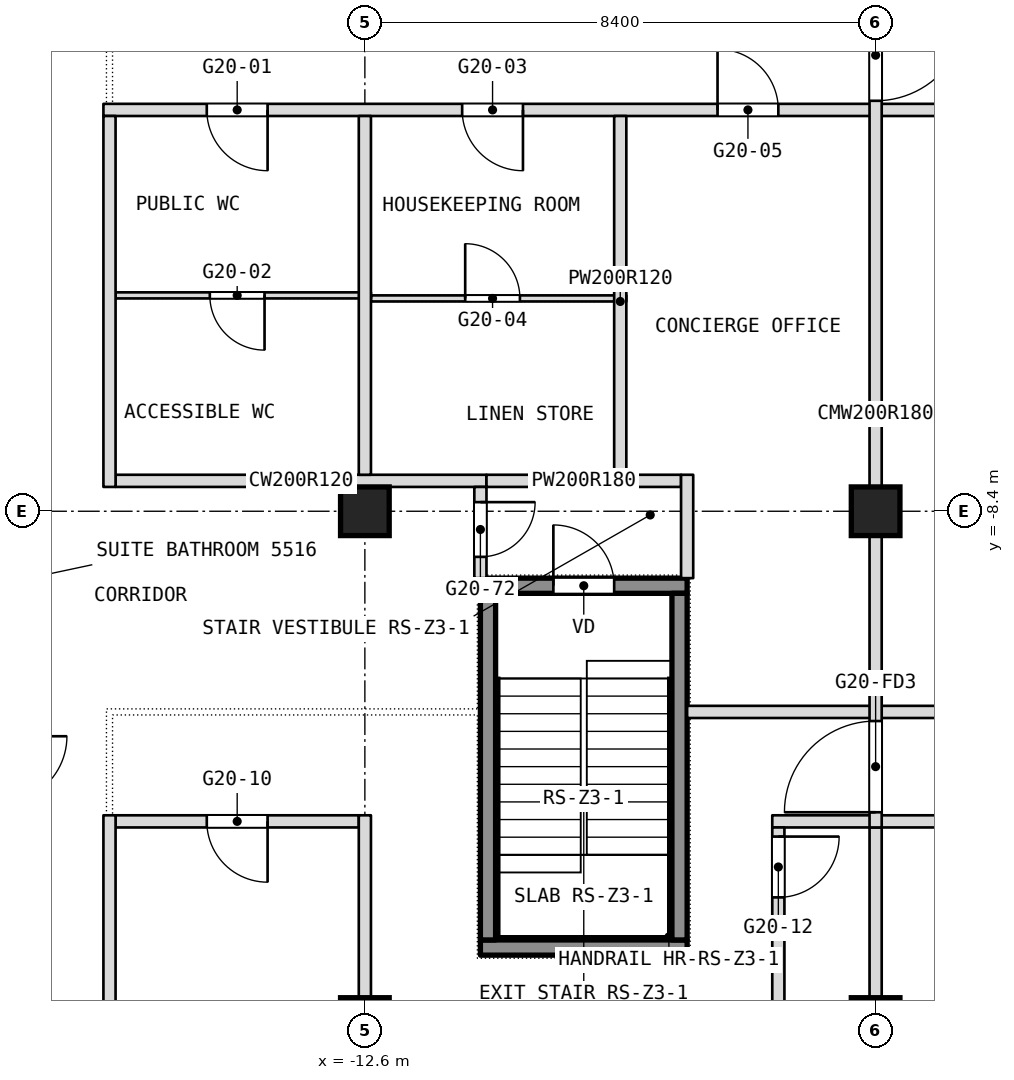
"""IFC4 building model, lengths in metres.
Left out: names, types, materials, properties, quantities, classifications, styles, units other than length and angle.
Written with IfcOpenShell. Run it as: python <this file> out.ifc"""

import sys

from ifc_helpers import new_model, si_unit, direction, frame, frame_2d, origin, origin_2d, place, context, subcontext, project, spatial, rectangle, extrude, element, fill, save


model = new_model("IFC4")
c1 = context("Model", 3, precision=1e-05, world=origin(), true_north=direction((0.0, 1.0)))
c2 = subcontext(c1, "Body", "Model", "MODEL_VIEW")
j1 = project(units=[si_unit("LENGTHUNIT", "METRE"), si_unit("PLANEANGLEUNIT", "RADIAN")], contexts=[c1])
p1 = place(None, origin())
s1 = spatial("IfcSite", under=j1, at=p1, CompositionType="ELEMENT")
p2 = place(p1, origin())
s2 = spatial("IfcBuilding", under=s1, at=p2, CompositionType="ELEMENT")
p3 = place(p2, frame((0.0, 0.0, 234.5)))
s3 = spatial("IfcBuildingStorey", under=s2, at=p3, CompositionType="ELEMENT", Elevation=234.5)
for number, where, z_axis, x_axis in (
    (1, (-12.6, -16.8, 0.0), (0.0, 0.0, 1.0), (1.0, 0.0, 0.0)),
    (2, (-12.6, -8.4, 0.0), (0.0, 0.0, 1.0), (1.0, 0.0, 0.0)),
    (3, (-4.2, -16.8, 0.0), (0.0, 0.0, 1.0), (1.0, 0.0, 0.0)),
    (4, (-4.2, -8.4, 0.0), (0.0, 0.0, 1.0), (1.0, 0.0, 0.0)),
):
    element("IfcColumn", number, at=place(p3, frame(where, z_axis=z_axis, x_axis=x_axis)), inside=s3, PredefinedType="COLUMN", context=c2, shape_type="SweptSolid", body=[
        extrude(rectangle(XDim=0.8, YDim=0.8, at=origin_2d()), origin(), (0.0, 0.0, 1.0), 3.6),
    ])
p4 = place(p3, frame((-16.7, -13.5, 0.0), z_axis=(0.0, 0.0, 1.0), x_axis=(1.0, 0.0, 0.0)))
e5 = element("IfcWall", 5, at=p4, inside=s3, PredefinedType="PARTITIONING", context=c2, shape_type="SweptSolid", body=[
    extrude(rectangle(XDim=4.0, YDim=0.2, at=frame_2d((2.0, 0.0))), origin(), (0.0, 0.0, 1.0), 3.34),
])
p5 = place(p4, frame((1.5, 0.0, 0.0)))
e6 = element("IfcOpeningElement", 6, at=p5, cuts=e5, PredefinedType="OPENING", context=c2, shape_type="SweptSolid", body=[
    extrude(rectangle(XDim=1.0, YDim=2.1, at=frame_2d((0.5, 1.05))), frame((0.0, 0.1, 0.0), z_axis=(0.0, -1.0, 0.0), x_axis=(1.0, 0.0, 0.0)), (0.0, 0.0, 1.0), 0.2),
])
p6 = place(p3, frame((-5.9, -13.5, 0.0), z_axis=(0.0, 0.0, 1.0), x_axis=(1.0, 0.0, 0.0)))
e7 = element("IfcWall", 7, at=p6, inside=s3, PredefinedType="PARTITIONING", context=c2, shape_type="SweptSolid", body=[
    extrude(rectangle(XDim=11.6, YDim=0.2, at=frame_2d((5.8, 0.0))), origin(), (0.0, 0.0, 1.0), 3.34),
])
p7 = place(p6, frame((3.3, 0.0, 0.0)))
e8 = element("IfcOpeningElement", 8, at=p7, cuts=e7, PredefinedType="OPENING", context=c2, shape_type="SweptSolid", body=[
    extrude(rectangle(XDim=1.0, YDim=2.1, at=frame_2d((0.5, 1.05))), frame((0.0, 0.1, 0.0), z_axis=(0.0, -1.0, 0.0), x_axis=(1.0, 0.0, 0.0)), (0.0, 0.0, 1.0), 0.2),
])
p8 = place(p6, frame((7.5, 0.0, 0.0)))
e9 = element("IfcOpeningElement", 9, at=p8, cuts=e7, PredefinedType="OPENING", context=c2, shape_type="SweptSolid", body=[
    extrude(rectangle(XDim=1.0, YDim=2.1, at=frame_2d((0.5, 1.05))), frame((0.0, 0.1, 0.0), z_axis=(0.0, -1.0, 0.0), x_axis=(1.0, 0.0, 0.0)), (0.0, 0.0, 1.0), 0.2),
])
p9 = place(p3, frame((-7.3, -11.7, 0.0), z_axis=(0.0, 0.0, 1.0), x_axis=(1.0, 0.0, 0.0)))
e10 = element("IfcWall", 10, at=p9, inside=s3, PredefinedType="PARTITIONING", context=c2, shape_type="SweptSolid", body=[
    extrude(rectangle(XDim=14.6, YDim=0.2, at=frame_2d((7.3, 0.0))), origin(), (0.0, 0.0, 1.0), 3.34),
])
p10 = place(p3, frame((-16.7, -7.9, 0.0), z_axis=(0.0, 0.0, 1.0), x_axis=(1.0, 0.0, 0.0)))
e11 = element("IfcWall", 11, at=p10, inside=s3, PredefinedType="PARTITIONING", context=c2, shape_type="SweptSolid", body=[
    extrude(rectangle(XDim=6.1, YDim=0.2, at=frame_2d((3.05, 0.0))), origin(), (0.0, 0.0, 1.0), 3.34),
])
p11 = place(p3, frame((-10.6, -7.9, 0.0), z_axis=(0.0, 0.0, 1.0), x_axis=(1.0, 0.0, 0.0)))
e12 = element("IfcWall", 12, at=p11, inside=s3, PredefinedType="PARTITIONING", context=c2, shape_type="SweptSolid", body=[
    extrude(rectangle(XDim=3.2, YDim=0.2, at=frame_2d((1.6, 0.0))), origin(), (0.0, 0.0, 1.0), 3.34),
])
p12 = place(p3, frame((-12.5, -4.9, 0.0), z_axis=(0.0, 0.0, 1.0), x_axis=(1.0, 0.0, 0.0)))
e13 = element("IfcWall", 13, at=p12, inside=s3, PredefinedType="PARTITIONING", context=c2, shape_type="SweptSolid", body=[
    extrude(rectangle(XDim=4.2, YDim=0.1, at=frame_2d((2.1, 0.0))), origin(), (0.0, 0.0, 1.0), 3.34),
])
p13 = place(p12, frame((1.55, 0.0, 0.0)))
e14 = element("IfcOpeningElement", 14, at=p13, cuts=e13, PredefinedType="OPENING", context=c2, shape_type="SweptSolid", body=[
    extrude(rectangle(XDim=0.9, YDim=2.1, at=frame_2d((0.45, 1.05))), frame((0.0, 0.05, 0.0), z_axis=(0.0, -1.0, 0.0), x_axis=(1.0, 0.0, 0.0)), (0.0, 0.0, 1.0), 0.1),
])
p14 = place(p3, frame((-16.7, -4.85, 0.0), z_axis=(0.0, 0.0, 1.0), x_axis=(1.0, 0.0, 0.0)))
e15 = element("IfcWall", 15, at=p14, inside=s3, PredefinedType="PARTITIONING", context=c2, shape_type="SweptSolid", body=[
    extrude(rectangle(XDim=4.2, YDim=0.1, at=frame_2d((2.1, 0.0))), origin(), (0.0, 0.0, 1.0), 3.34),
])
p15 = place(p14, frame((1.55, 0.0, 0.0)))
e16 = element("IfcOpeningElement", 16, at=p15, cuts=e15, PredefinedType="OPENING", context=c2, shape_type="SweptSolid", body=[
    extrude(rectangle(XDim=0.9, YDim=2.1, at=frame_2d((0.45, 1.05))), frame((0.0, 0.05, 0.0), z_axis=(0.0, -1.0, 0.0), x_axis=(1.0, 0.0, 0.0)), (0.0, 0.0, 1.0), 0.1),
])
p16 = place(p3, frame((-16.9, -1.8, 0.0), z_axis=(0.0, 0.0, 1.0), x_axis=(1.0, 0.0, 0.0)))
e17 = element("IfcWall", 17, at=p16, inside=s3, PredefinedType="PARTITIONING", context=c2, shape_type="SweptSolid", body=[
    extrude(rectangle(XDim=33.8, YDim=0.2, at=frame_2d((16.9, 0.0))), origin(), (0.0, 0.0, 1.0), 3.34),
])
p17 = place(p16, frame((1.7, 0.0, 0.0)))
e18 = element("IfcOpeningElement", 18, at=p17, cuts=e17, PredefinedType="OPENING", context=c2, shape_type="SweptSolid", body=[
    extrude(rectangle(XDim=1.0, YDim=2.1, at=frame_2d((0.5, 1.05))), frame((0.0, 0.1, 0.0), z_axis=(0.0, -1.0, 0.0), x_axis=(1.0, 0.0, 0.0)), (0.0, 0.0, 1.0), 0.2),
])
p18 = place(p16, frame((5.9, 0.0, 0.0)))
e19 = element("IfcOpeningElement", 19, at=p18, cuts=e17, PredefinedType="OPENING", context=c2, shape_type="SweptSolid", body=[
    extrude(rectangle(XDim=1.0, YDim=2.1, at=frame_2d((0.5, 1.05))), frame((0.0, 0.1, 0.0), z_axis=(0.0, -1.0, 0.0), x_axis=(1.0, 0.0, 0.0)), (0.0, 0.0, 1.0), 0.2),
])
p19 = place(p16, frame((10.1, 0.0, 0.0)))
e20 = element("IfcOpeningElement", 20, at=p19, cuts=e17, PredefinedType="OPENING", context=c2, shape_type="SweptSolid", body=[
    extrude(rectangle(XDim=1.0, YDim=2.1, at=frame_2d((0.5, 1.05))), frame((0.0, 0.1, 0.0), z_axis=(0.0, -1.0, 0.0), x_axis=(1.0, 0.0, 0.0)), (0.0, 0.0, 1.0), 0.2),
])
p20 = place(p16, frame((16.0, 0.0, 0.0)))
e21 = element("IfcOpeningElement", 21, at=p20, cuts=e17, PredefinedType="OPENING", context=c2, shape_type="SweptSolid", body=[
    extrude(rectangle(XDim=1.8, YDim=2.1, at=frame_2d((0.9, 1.05))), frame((0.0, 0.1, 0.0), z_axis=(0.0, -1.0, 0.0), x_axis=(1.0, 0.0, 0.0)), (0.0, 0.0, 1.0), 0.2),
])
p21 = place(p16, frame((22.7, 0.0, 0.0)))
e22 = element("IfcOpeningElement", 22, at=p21, cuts=e17, PredefinedType="OPENING", context=c2, shape_type="SweptSolid", body=[
    extrude(rectangle(XDim=1.0, YDim=2.1, at=frame_2d((0.5, 1.05))), frame((0.0, 0.1, 0.0), z_axis=(0.0, -1.0, 0.0), x_axis=(1.0, 0.0, 0.0)), (0.0, 0.0, 1.0), 0.2),
])
p22 = place(p16, frame((26.9, 0.0, 0.0)))
e23 = element("IfcOpeningElement", 23, at=p22, cuts=e17, PredefinedType="OPENING", context=c2, shape_type="SweptSolid", body=[
    extrude(rectangle(XDim=1.0, YDim=2.1, at=frame_2d((0.5, 1.05))), frame((0.0, 0.1, 0.0), z_axis=(0.0, -1.0, 0.0), x_axis=(1.0, 0.0, 0.0)), (0.0, 0.0, 1.0), 0.2),
])
p23 = place(p16, frame((31.1, 0.0, 0.0)))
e24 = element("IfcOpeningElement", 24, at=p23, cuts=e17, PredefinedType="OPENING", context=c2, shape_type="SweptSolid", body=[
    extrude(rectangle(XDim=1.0, YDim=2.1, at=frame_2d((0.5, 1.05))), frame((0.0, 0.1, 0.0), z_axis=(0.0, -1.0, 0.0), x_axis=(1.0, 0.0, 0.0)), (0.0, 0.0, 1.0), 0.2),
])
p24 = place(p3, frame((-4.2, -22.0, 0.0), z_axis=(0.0, 0.0, 1.0), x_axis=(0.0, 1.0, 0.0)))
e25 = element("IfcWall", 25, at=p24, inside=s3, PredefinedType="PARTITIONING", context=c2, shape_type="SweptSolid", body=[
    extrude(rectangle(XDim=8.4, YDim=0.2, at=frame_2d((4.2, 0.0))), origin(), (0.0, 0.0, 1.0), 3.34),
])
p25 = place(p24, frame((0.25, 0.0, 0.0)))
e26 = element("IfcOpeningElement", 26, at=p25, cuts=e25, PredefinedType="OPENING", context=c2, shape_type="SweptSolid", body=[
    extrude(rectangle(XDim=1.5, YDim=2.1, at=frame_2d((0.75, 1.05))), frame((0.0, 0.1, 0.0), z_axis=(0.0, -1.0, 0.0), x_axis=(1.0, 0.0, 0.0)), (0.0, 0.0, 1.0), 0.2),
])
p26 = place(p3, frame((-4.2, -13.6, 0.0), z_axis=(0.0, 0.0, 1.0), x_axis=(0.0, 1.0, 0.0)))
e27 = element("IfcWall", 27, at=p26, inside=s3, PredefinedType="PARTITIONING", context=c2, shape_type="SweptSolid", body=[
    extrude(rectangle(XDim=13.6, YDim=0.2, at=frame_2d((6.8, 0.0))), origin(), (0.0, 0.0, 1.0), 3.34),
])
p27 = place(p26, frame((11.95, 0.0, 0.0)))
e28 = element("IfcOpeningElement", 28, at=p27, cuts=e27, PredefinedType="OPENING", context=c2, shape_type="SweptSolid", body=[
    extrude(rectangle(XDim=1.5, YDim=2.1, at=frame_2d((0.75, 1.05))), frame((0.0, 0.1, 0.0), z_axis=(0.0, -1.0, 0.0), x_axis=(1.0, 0.0, 0.0)), (0.0, 0.0, 1.0), 0.2),
])
p28 = place(p26, frame((0.25, 0.0, 0.0)))
e29 = element("IfcOpeningElement", 29, at=p28, cuts=e27, PredefinedType="OPENING", context=c2, shape_type="SweptSolid", body=[
    extrude(rectangle(XDim=1.5, YDim=2.1, at=frame_2d((0.75, 1.05))), frame((0.0, 0.1, 0.0), z_axis=(0.0, -1.0, 0.0), x_axis=(1.0, 0.0, 0.0)), (0.0, 0.0, 1.0), 0.2),
])
p29 = place(p3, frame((-5.8, -18.5, 0.0), z_axis=(0.0, 0.0, 1.0), x_axis=(0.0, 1.0, 0.0)))
e30 = element("IfcWall", 30, at=p29, inside=s3, PredefinedType="PARTITIONING", context=c2, shape_type="SweptSolid", body=[
    extrude(rectangle(XDim=4.9, YDim=0.2, at=frame_2d((2.45, 0.0))), origin(), (0.0, 0.0, 1.0), 3.34),
])
p30 = place(p29, frame((3.75, 0.0, 0.0)))
e31 = element("IfcOpeningElement", 31, at=p30, cuts=e30, PredefinedType="OPENING", context=c2, shape_type="SweptSolid", body=[
    extrude(rectangle(XDim=1.0, YDim=2.1, at=frame_2d((0.5, 1.05))), frame((0.0, 0.1, 0.0), z_axis=(0.0, -1.0, 0.0), x_axis=(1.0, 0.0, 0.0)), (0.0, 0.0, 1.0), 0.2),
])
p31 = place(p3, frame((-7.3, -9.5, 0.0), z_axis=(0.0, 0.0, 1.0), x_axis=(0.0, 1.0, 0.0)))
e32 = element("IfcWall", 32, at=p31, inside=s3, PredefinedType="PARTITIONING", context=c2, shape_type="SweptSolid", body=[
    extrude(rectangle(XDim=1.7, YDim=0.2, at=frame_2d((0.85, 0.0))), origin(), (0.0, 0.0, 1.0), 3.34),
])
p32 = place(p3, frame((-8.4, -8.0, 0.0), z_axis=(0.0, 0.0, 1.0), x_axis=(0.0, 1.0, 0.0)))
e33 = element("IfcWall", 33, at=p32, inside=s3, PredefinedType="PARTITIONING", context=c2, shape_type="SweptSolid", body=[
    extrude(rectangle(XDim=6.1, YDim=0.2, at=frame_2d((3.05, 0.0))), origin(), (0.0, 0.0, 1.0), 3.34),
])
p33 = place(p3, frame((-10.7, -9.5, 0.0), z_axis=(0.0, 0.0, 1.0), x_axis=(0.0, 1.0, 0.0)))
e34 = element("IfcWall", 34, at=p33, inside=s3, PredefinedType="PARTITIONING", context=c2, shape_type="SweptSolid", body=[
    extrude(rectangle(XDim=1.5, YDim=0.2, at=frame_2d((0.75, 0.0))), origin(), (0.0, 0.0, 1.0), 3.34),
])
p34 = place(p33, frame((0.35, 0.0, 0.0)))
e35 = element("IfcOpeningElement", 35, at=p34, cuts=e34, PredefinedType="OPENING", context=c2, shape_type="SweptSolid", body=[
    extrude(rectangle(XDim=0.9, YDim=2.1, at=frame_2d((0.45, 1.05))), frame((0.0, 0.1, 0.0), z_axis=(0.0, -1.0, 0.0), x_axis=(1.0, 0.0, 0.0)), (0.0, 0.0, 1.0), 0.2),
])
p35 = place(p3, frame((-12.6, -7.8, 0.0), z_axis=(0.0, 0.0, 1.0), x_axis=(0.0, 1.0, 0.0)))
e36 = element("IfcWall", 36, at=p35, inside=s3, PredefinedType="PARTITIONING", context=c2, shape_type="SweptSolid", body=[
    extrude(rectangle(XDim=5.9, YDim=0.2, at=frame_2d((2.95, 0.0))), origin(), (0.0, 0.0, 1.0), 3.34),
])
p36 = place(p3, frame((-12.6, -18.5, 0.0), z_axis=(0.0, 0.0, 1.0), x_axis=(0.0, 1.0, 0.0)))
e37 = element("IfcWall", 37, at=p36, inside=s3, PredefinedType="PARTITIONING", context=c2, shape_type="SweptSolid", body=[
    extrude(rectangle(XDim=5.1, YDim=0.2, at=frame_2d((2.55, 0.0))), origin(), (0.0, 0.0, 1.0), 3.34),
])
p37 = place(p3, frame((-16.8, -20.2, 0.0), z_axis=(0.0, 0.0, 1.0), x_axis=(0.0, 1.0, 0.0)))
e38 = element("IfcWall", 38, at=p37, inside=s3, PredefinedType="PARTITIONING", context=c2, shape_type="SweptSolid", body=[
    extrude(rectangle(XDim=6.8, YDim=0.2, at=frame_2d((3.4, 0.0))), origin(), (0.0, 0.0, 1.0), 3.34),
])
p38 = place(p3, frame((-16.8, -8.0, 0.0), z_axis=(0.0, 0.0, 1.0), x_axis=(0.0, 1.0, 0.0)))
e39 = element("IfcWall", 39, at=p38, inside=s3, PredefinedType="PARTITIONING", context=c2, shape_type="SweptSolid", body=[
    extrude(rectangle(XDim=6.1, YDim=0.2, at=frame_2d((3.05, 0.0))), origin(), (0.0, 0.0, 1.0), 3.34),
])
p39 = place(p3, frame((-10.7, -15.575, 0.1), z_axis=(0.0, 0.0, 1.0), x_axis=(1.0, 0.0, 0.0)))
e40 = element("IfcWall", 40, at=p39, inside=s3, PredefinedType="SHEAR", context=c2, shape_type="SweptSolid", body=[
    extrude(rectangle(XDim=3.4, YDim=0.25, at=frame_2d((1.7, 0.0))), origin(), (0.0, 0.0, 1.0), 3.6),
])
p40 = place(p3, frame((-10.7, -9.625, 0.1), z_axis=(0.0, 0.0, 1.0), x_axis=(1.0, 0.0, 0.0)))
e41 = element("IfcWall", 41, at=p40, inside=s3, PredefinedType="SHEAR", context=c2, shape_type="SweptSolid", body=[
    extrude(rectangle(XDim=3.4, YDim=0.25, at=frame_2d((1.7, 0.0))), origin(), (0.0, 0.0, 1.0), 3.6),
])
p41 = place(p40, frame((1.2, 0.0, 0.0)))
e42 = element("IfcOpeningElement", 42, at=p41, cuts=e41, PredefinedType="OPENING", context=c2, shape_type="SweptSolid", body=[
    extrude(rectangle(XDim=1.0, YDim=2.1, at=frame_2d((0.5, 1.05))), frame((0.0, 0.125, 0.0), z_axis=(0.0, -1.0, 0.0), x_axis=(1.0, 0.0, 0.0)), (0.0, 0.0, 1.0), 0.25),
])
for number, where, z_axis, x_axis in (
    (43, (-10.575, -15.45, 0.1), (0.0, 0.0, 1.0), (0.0, 1.0, 0.0)),
    (44, (-7.425, -15.45, 0.1), (0.0, 0.0, 1.0), (0.0, 1.0, 0.0)),
):
    element("IfcWall", number, at=place(p3, frame(where, z_axis=z_axis, x_axis=x_axis)), inside=s3, PredefinedType="SHEAR", context=c2, shape_type="SweptSolid", body=[
        extrude(rectangle(XDim=5.7, YDim=0.25, at=frame_2d((2.85, 0.0))), origin(), (0.0, 0.0, 1.0), 3.6),
    ])
p42 = place(p5, origin())
e45 = element("IfcDoor", 45, at=p42, inside=s3, OperationType="SINGLE_SWING_RIGHT", PredefinedType="DOOR", context=c2, shape_type="SweptSolid", body=[
    extrude(rectangle(XDim=1.0, YDim=2.1, at=frame_2d((0.5, 1.05))), frame((0.0, 0.025, 0.0), z_axis=(0.0, -1.0, 0.0), x_axis=(1.0, 0.0, 0.0)), (0.0, 0.0, 1.0), 0.05),
])
fill(e6, e45)
p43 = place(p13, origin())
e46 = element("IfcDoor", 46, at=p43, inside=s3, OperationType="SINGLE_SWING_RIGHT", PredefinedType="DOOR", context=c2, shape_type="SweptSolid", body=[
    extrude(rectangle(XDim=0.9, YDim=2.1, at=frame_2d((0.45, 1.05))), frame((0.0, 0.025, 0.0), z_axis=(0.0, -1.0, 0.0), x_axis=(1.0, 0.0, 0.0)), (0.0, 0.0, 1.0), 0.05),
])
fill(e14, e46)
p44 = place(p15, origin())
e47 = element("IfcDoor", 47, at=p44, inside=s3, OperationType="SINGLE_SWING_RIGHT", PredefinedType="DOOR", context=c2, shape_type="SweptSolid", body=[
    extrude(rectangle(XDim=0.9, YDim=2.1, at=frame_2d((0.45, 1.05))), frame((0.0, 0.025, 0.0), z_axis=(0.0, -1.0, 0.0), x_axis=(1.0, 0.0, 0.0)), (0.0, 0.0, 1.0), 0.05),
])
fill(e16, e47)
p45 = place(p17, origin())
e48 = element("IfcDoor", 48, at=p45, inside=s3, OperationType="SINGLE_SWING_LEFT", PredefinedType="DOOR", context=c2, shape_type="SweptSolid", body=[
    extrude(rectangle(XDim=1.0, YDim=2.1, at=frame_2d((0.5, 1.05))), frame((0.0, 0.025, 0.0), z_axis=(0.0, -1.0, 0.0), x_axis=(1.0, 0.0, 0.0)), (0.0, 0.0, 1.0), 0.05),
])
fill(e18, e48)
p46 = place(p18, origin())
e49 = element("IfcDoor", 49, at=p46, inside=s3, OperationType="SINGLE_SWING_LEFT", PredefinedType="DOOR", context=c2, shape_type="SweptSolid", body=[
    extrude(rectangle(XDim=1.0, YDim=2.1, at=frame_2d((0.5, 1.05))), frame((0.0, 0.025, 0.0), z_axis=(0.0, -1.0, 0.0), x_axis=(1.0, 0.0, 0.0)), (0.0, 0.0, 1.0), 0.05),
])
fill(e19, e49)
p47 = place(p19, origin())
e50 = element("IfcDoor", 50, at=p47, inside=s3, OperationType="SINGLE_SWING_RIGHT", PredefinedType="DOOR", context=c2, shape_type="SweptSolid", body=[
    extrude(rectangle(XDim=1.0, YDim=2.1, at=frame_2d((0.5, 1.05))), frame((0.0, 0.025, 0.0), z_axis=(0.0, -1.0, 0.0), x_axis=(1.0, 0.0, 0.0)), (0.0, 0.0, 1.0), 0.05),
])
fill(e20, e50)
p48 = place(p30, origin())
e51 = element("IfcDoor", 51, at=p48, inside=s3, OperationType="SINGLE_SWING_RIGHT", PredefinedType="DOOR", context=c2, shape_type="SweptSolid", body=[
    extrude(rectangle(XDim=1.0, YDim=2.1, at=frame_2d((0.5, 1.05))), frame((0.0, 0.025, 0.0), z_axis=(0.0, -1.0, 0.0), x_axis=(1.0, 0.0, 0.0)), (0.0, 0.0, 1.0), 0.05),
])
fill(e31, e51)
p49 = place(p34, origin())
e52 = element("IfcDoor", 52, at=p49, inside=s3, OperationType="SINGLE_SWING_LEFT", PredefinedType="DOOR", context=c2, shape_type="SweptSolid", body=[
    extrude(rectangle(XDim=0.9, YDim=2.1, at=frame_2d((0.45, 1.05))), frame((0.0, 0.025, 0.0), z_axis=(0.0, -1.0, 0.0), x_axis=(1.0, 0.0, 0.0)), (0.0, 0.0, 1.0), 0.05),
])
fill(e35, e52)
p50 = place(p41, origin())
e53 = element("IfcDoor", 53, at=p50, inside=s3, OperationType="SINGLE_SWING_LEFT", PredefinedType="DOOR", context=c2, shape_type="SweptSolid", body=[
    extrude(rectangle(XDim=1.0, YDim=2.1, at=frame_2d((0.5, 1.05))), frame((0.0, 0.025, 0.0), z_axis=(0.0, -1.0, 0.0), x_axis=(1.0, 0.0, 0.0)), (0.0, 0.0, 1.0), 0.05),
])
fill(e42, e53)
p51 = place(p27, origin())
e54 = element("IfcDoor", 54, at=p51, inside=s3, OperationType="DOUBLE_DOOR_DOUBLE_SWING", PredefinedType="DOOR", context=c2, shape_type="SweptSolid", body=[
    extrude(rectangle(XDim=1.5, YDim=2.1, at=frame_2d((0.75, 1.05))), frame((0.0, 0.025, 0.0), z_axis=(0.0, -1.0, 0.0), x_axis=(1.0, 0.0, 0.0)), (0.0, 0.0, 1.0), 0.05),
])
fill(e28, e54)
p52 = place(p28, origin())
e55 = element("IfcDoor", 55, at=p52, inside=s3, OperationType="DOUBLE_DOOR_DOUBLE_SWING", PredefinedType="DOOR", context=c2, shape_type="SweptSolid", body=[
    extrude(rectangle(XDim=1.5, YDim=2.1, at=frame_2d((0.75, 1.05))), frame((0.0, 0.025, 0.0), z_axis=(0.0, -1.0, 0.0), x_axis=(1.0, 0.0, 0.0)), (0.0, 0.0, 1.0), 0.05),
])
fill(e29, e55)
save(model, sys.argv[1])
